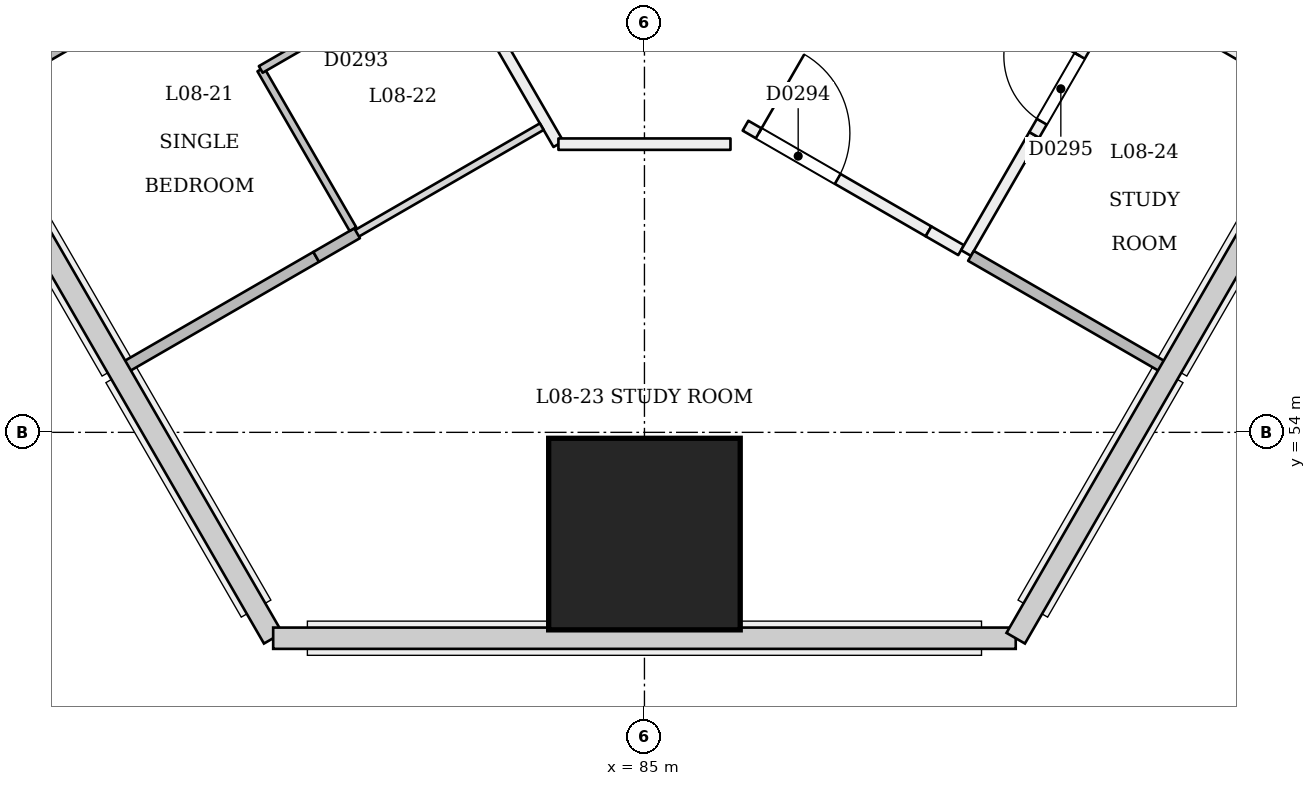
"""IFC4 building model, lengths in metres.
Left out: names, types, materials, properties, quantities, classifications, styles, units other than length and angle.
Written with IfcOpenShell. Run it as: python <this file> out.ifc"""

import sys

from ifc_helpers import new_model, si_unit, direction, frame, frame_2d, origin, origin_2d, place, context, subcontext, project, spatial, rectangle, extrude, element, fill, save


model = new_model("IFC4")
c1 = context("Model", 3, precision=1e-05, world=origin(), true_north=direction((0.0, 1.0)))
c2 = subcontext(c1, "Body", "Model", "MODEL_VIEW")
j1 = project(units=[si_unit("LENGTHUNIT", "METRE"), si_unit("PLANEANGLEUNIT", "RADIAN")], contexts=[c1])
p1 = place(None, origin())
s1 = spatial("IfcSite", under=j1, at=p1, CompositionType="ELEMENT")
p2 = place(p1, origin())
s2 = spatial("IfcBuilding", under=s1, at=p2, CompositionType="ELEMENT")
p3 = place(p2, frame((0.0, 0.0, 37.8)))
s3 = spatial("IfcBuildingStorey", under=s2, at=p3, CompositionType="ELEMENT", Elevation=37.8)
p4 = place(p3, frame((85.0, 52.592, 0.0), z_axis=(0.0, 0.058360852261, 0.998295552892), x_axis=(-1.0, 0.0, 0.0)))
e1 = element("IfcColumn", 1, at=p4, inside=s3, PredefinedType="COLUMN", context=c2, shape_type="SweptSolid", body=[
    extrude(rectangle(XDim=2.52, YDim=2.52, at=origin_2d()), origin(), (0.0, 0.0, 1.0), 3.606),
])
p5 = place(p3, frame((61.497, 96.54, 0.0), z_axis=(0.0, 0.0, 1.0), x_axis=(0.499995935097, -0.866027750645, 0.0)))
e2 = element("IfcWall", 2, at=p5, inside=s3, PredefinedType="PARTITIONING", context=c2, shape_type="SweptSolid", body=[
    extrude(rectangle(XDim=44.742, YDim=0.15, at=frame_2d((22.371, 0.0))), origin(), (0.0, 0.0, 1.0), 2.7),
])
p6 = place(p5, frame((1.84, 0.0, 0.0)))
e3 = element("IfcOpeningElement", 3, at=p6, cuts=e2, PredefinedType="OPENING", context=c2, shape_type="SweptSolid", body=[
    extrude(rectangle(XDim=1.0, YDim=2.1, at=frame_2d((0.5, 1.05))), frame((0.0, 0.085, 0.0), z_axis=(0.0, -1.0, 0.0), x_axis=(1.0, 0.0, 0.0)), (0.0, 0.0, 1.0), 0.171),
])
p7 = place(p5, frame((4.942, 0.0, 0.0)))
e4 = element("IfcOpeningElement", 4, at=p7, cuts=e2, PredefinedType="OPENING", context=c2, shape_type="SweptSolid", body=[
    extrude(rectangle(XDim=1.1, YDim=2.1, at=frame_2d((0.55, 1.05))), frame((0.0, 0.085, 0.0), z_axis=(0.0, -1.0, 0.0), x_axis=(1.0, 0.0, 0.0)), (0.0, 0.0, 1.0), 0.171),
])
p8 = place(p5, frame((11.651, 0.0, 0.0)))
e5 = element("IfcOpeningElement", 5, at=p8, cuts=e2, PredefinedType="OPENING", context=c2, shape_type="SweptSolid", body=[
    extrude(rectangle(XDim=1.0, YDim=2.1, at=frame_2d((0.5, 1.05))), frame((0.0, 0.085, 0.0), z_axis=(0.0, -1.0, 0.0), x_axis=(1.0, 0.0, 0.0)), (0.0, 0.0, 1.0), 0.171),
])
p9 = place(p5, frame((18.371, 0.0, 0.0)))
e6 = element("IfcOpeningElement", 6, at=p9, cuts=e2, PredefinedType="OPENING", context=c2, shape_type="SweptSolid", body=[
    extrude(rectangle(XDim=1.2, YDim=2.1, at=frame_2d((0.6, 1.05))), frame((0.0, 0.085, 0.0), z_axis=(0.0, -1.0, 0.0), x_axis=(1.0, 0.0, 0.0)), (0.0, 0.0, 1.0), 0.171),
])
p10 = place(p5, frame((23.092, 0.0, 0.0)))
e7 = element("IfcOpeningElement", 7, at=p10, cuts=e2, PredefinedType="OPENING", context=c2, shape_type="SweptSolid", body=[
    extrude(rectangle(XDim=1.0, YDim=2.1, at=frame_2d((0.5, 1.05))), frame((0.0, 0.085, 0.0), z_axis=(0.0, -1.0, 0.0), x_axis=(1.0, 0.0, 0.0)), (0.0, 0.0, 1.0), 0.171),
])
p11 = place(p5, frame((29.767, 0.0, 0.0)))
e8 = element("IfcOpeningElement", 8, at=p11, cuts=e2, PredefinedType="OPENING", context=c2, shape_type="SweptSolid", body=[
    extrude(rectangle(XDim=1.0, YDim=2.1, at=frame_2d((0.5, 1.05))), frame((0.0, 0.085, 0.0), z_axis=(0.0, -1.0, 0.0), x_axis=(1.0, 0.0, 0.0)), (0.0, 0.0, 1.0), 0.171),
])
p12 = place(p5, frame((31.976, 0.0, 0.0)))
e9 = element("IfcOpeningElement", 9, at=p12, cuts=e2, PredefinedType="OPENING", context=c2, shape_type="SweptSolid", body=[
    extrude(rectangle(XDim=1.0, YDim=2.1, at=frame_2d((0.5, 1.05))), frame((0.0, 0.085, 0.0), z_axis=(0.0, -1.0, 0.0), x_axis=(1.0, 0.0, 0.0)), (0.0, 0.0, 1.0), 0.171),
])
p13 = place(p5, frame((38.767, 0.0, 0.0)))
e10 = element("IfcOpeningElement", 10, at=p13, cuts=e2, PredefinedType="OPENING", context=c2, shape_type="SweptSolid", body=[
    extrude(rectangle(XDim=1.0, YDim=2.1, at=frame_2d((0.5, 1.05))), frame((0.0, 0.085, 0.0), z_axis=(0.0, -1.0, 0.0), x_axis=(1.0, 0.0, 0.0)), (0.0, 0.0, 1.0), 0.171),
])
p14 = place(p5, frame((40.707, 0.0, 0.0)))
e11 = element("IfcOpeningElement", 11, at=p14, cuts=e2, PredefinedType="OPENING", context=c2, shape_type="SweptSolid", body=[
    extrude(rectangle(XDim=1.0, YDim=2.1, at=frame_2d((0.5, 1.05))), frame((0.0, 0.085, 0.0), z_axis=(0.0, -1.0, 0.0), x_axis=(1.0, 0.0, 0.0)), (0.0, 0.0, 1.0), 0.171),
])
p15 = place(p3, frame((83.868, 57.792, 0.0), z_axis=(0.0, 0.0, 1.0), x_axis=(1.0, 0.0, 0.0)))
e12 = element("IfcWall", 12, at=p15, inside=s3, PredefinedType="PARTITIONING", context=c2, shape_type="SweptSolid", body=[
    extrude(rectangle(XDim=2.264, YDim=0.15, at=frame_2d((1.132, 0.0))), origin(), (0.0, 0.0, 1.0), 3.1),
])
p16 = place(p3, frame((86.33, 58.034, 0.0), z_axis=(0.0, 0.0, 1.0), x_axis=(0.86603494908, -0.499983466698, 0.0)))
e13 = element("IfcWall", 13, at=p16, inside=s3, PredefinedType="PARTITIONING", context=c2, shape_type="SweptSolid", body=[
    extrude(rectangle(XDim=2.78, YDim=0.15, at=frame_2d((1.39, 0.0))), origin(), (0.0, 0.0, 1.0), 3.1),
])
p17 = place(p16, frame((0.2, 0.0, 0.0)))
e14 = element("IfcOpeningElement", 14, at=p17, cuts=e13, PredefinedType="OPENING", context=c2, shape_type="SweptSolid", body=[
    extrude(rectangle(XDim=1.2, YDim=2.1, at=frame_2d((0.6, 1.05))), frame((0.0, 0.085, 0.0), z_axis=(0.0, -1.0, 0.0), x_axis=(1.0, 0.0, 0.0)), (0.0, 0.0, 1.0), 0.171),
])
p18 = place(p3, frame((88.737, 56.645, 0.0), z_axis=(0.0, 0.0, 1.0), x_axis=(0.866111716277, -0.49985047257, 0.0)))
e15 = element("IfcWall", 15, at=p18, inside=s3, PredefinedType="PARTITIONING", context=c2, shape_type="SweptSolid", body=[
    extrude(rectangle(XDim=0.495, YDim=0.15, at=frame_2d((0.248, 0.0))), origin(), (0.0, 0.0, 1.0), 2.6),
])
p19 = place(p3, frame((89.231, 56.359, 0.0), z_axis=(0.0, 0.0, 1.0), x_axis=(0.500016891966, 0.866015650984, 0.0)))
e16 = element("IfcWall", 16, at=p19, inside=s3, PredefinedType="PARTITIONING", context=c2, shape_type="SweptSolid", body=[
    extrude(rectangle(XDim=1.794, YDim=0.15, at=frame_2d((0.897, 0.0))), origin(), (0.0, 0.0, 1.0), 2.6),
])
p20 = place(p3, frame((90.128, 57.913, 0.0), z_axis=(0.0, 0.0, 1.0), x_axis=(0.499947354807, 0.866055796367, 0.0)))
e17 = element("IfcWall", 17, at=p20, inside=s3, PredefinedType="PARTITIONING", context=c2, shape_type="SweptSolid", body=[
    extrude(rectangle(XDim=2.193, YDim=0.15, at=frame_2d((1.096, 0.0))), origin(), (0.0, 0.0, 1.0), 3.1),
])
p21 = place(p20, frame((0.2, 0.0, 0.0)))
e18 = element("IfcOpeningElement", 18, at=p21, cuts=e17, PredefinedType="OPENING", context=c2, shape_type="SweptSolid", body=[
    extrude(rectangle(XDim=1.0, YDim=2.1, at=frame_2d((0.5, 1.05))), frame((0.0, 0.085, 0.0), z_axis=(0.0, -1.0, 0.0), x_axis=(1.0, 0.0, 0.0)), (0.0, 0.0, 1.0), 0.171),
])
p22 = place(p3, frame((76.123, 58.367, 0.0), z_axis=(0.0, 0.0, 1.0), x_axis=(0.866025401434, 0.500000004071, 0.0)))
e19 = element("IfcWall", 19, at=p22, inside=s3, PredefinedType="PARTITIONING", context=c2, shape_type="SweptSolid", body=[
    extrude(rectangle(XDim=6.345, YDim=0.15, at=frame_2d((3.173, 0.0))), origin(), (0.0, 0.0, 1.0), 2.6),
])
p23 = place(p3, frame((81.165, 56.674, 0.0), z_axis=(0.0, 0.0, 1.0), x_axis=(-0.499972286653, 0.866041403502, 0.0)))
e20 = element("IfcWall", 20, at=p23, inside=s3, PredefinedType="PARTITIONING", context=c2, shape_type="SweptSolid", body=[
    extrude(rectangle(XDim=2.425, YDim=0.1, at=frame_2d((1.212, 0.0))), origin(), (0.0, 0.0, 1.0), 2.6),
])
p24 = place(p3, frame((79.952, 58.774, 0.0), z_axis=(0.0, 0.0, 1.0), x_axis=(0.866011447264, 0.500024172624, 0.0)))
e21 = element("IfcWall", 21, at=p24, inside=s3, PredefinedType="PARTITIONING", context=c2, shape_type="SweptSolid", body=[
    extrude(rectangle(XDim=2.825, YDim=0.1, at=frame_2d((1.413, 0.0))), origin(), (0.0, 0.0, 1.0), 3.1),
])
p25 = place(p24, frame((1.0, 0.0, 0.0)))
e22 = element("IfcOpeningElement", 22, at=p25, cuts=e21, PredefinedType="OPENING", context=c2, shape_type="SweptSolid", body=[
    extrude(rectangle(XDim=0.9, YDim=2.1, at=frame_2d((0.45, 1.05))), frame((0.0, 0.061, 0.0), z_axis=(0.0, -1.0, 0.0), x_axis=(1.0, 0.0, 0.0)), (0.0, 0.0, 1.0), 0.121),
])
p26 = place(p3, frame((78.154, 54.849, 0.0), z_axis=(0.0, 0.0, 1.0), x_axis=(0.866057444692, 0.499944499413, 0.0)))
e23 = element("IfcWall", 23, at=p26, inside=s3, PredefinedType="PARTITIONING", context=c2, shape_type="SweptSolid", body=[
    extrude(rectangle(XDim=2.919, YDim=0.15, at=frame_2d((1.459, 0.0))), origin(), (0.0, 0.0, 1.0), 3.1),
])
p27 = place(p3, frame((80.681, 56.309, 0.0), z_axis=(0.0, 0.0, 1.0), x_axis=(0.865936922628, 0.500153222552, 0.0)))
e24 = element("IfcWall", 24, at=p27, inside=s3, PredefinedType="PARTITIONING", context=c2, shape_type="SweptSolid", body=[
    extrude(rectangle(XDim=0.621, YDim=0.15, at=frame_2d((0.311, 0.0))), origin(), (0.0, 0.0, 1.0), 2.6),
])
p28 = place(p3, frame((81.185, 56.599, 0.0), z_axis=(0.0, 0.0, 1.0), x_axis=(0.866011243319, 0.500024525844, 0.0)))
e25 = element("IfcWall", 25, at=p28, inside=s3, PredefinedType="PARTITIONING", context=c2, shape_type="SweptSolid", body=[
    extrude(rectangle(XDim=2.845, YDim=0.1, at=frame_2d((1.422, 0.0))), origin(), (0.0, 0.0, 1.0), 2.6),
])
p29 = place(p3, frame((91.846, 54.849, 0.0), z_axis=(0.0, 0.0, 1.0), x_axis=(-0.866046160531, 0.499964046536, 0.0)))
e26 = element("IfcWall", 26, at=p29, inside=s3, PredefinedType="PARTITIONING", context=c2, shape_type="SweptSolid", body=[
    extrude(rectangle(XDim=2.945, YDim=0.15, at=frame_2d((1.473, 0.0))), origin(), (0.0, 0.0, 1.0), 3.1),
])
p30 = place(p3, frame((93.877, 58.367, 0.0), z_axis=(0.0, 0.0, 1.0), x_axis=(-0.866050933658, 0.499955778354, 0.0)))
e27 = element("IfcWall", 27, at=p30, inside=s3, PredefinedType="PARTITIONING", context=c2, shape_type="SweptSolid", body=[
    extrude(rectangle(XDim=4.74, YDim=0.15, at=frame_2d((2.37, 0.0))), origin(), (0.0, 0.0, 1.0), 2.6),
])
p31 = place(p17, origin())
e28 = element("IfcDoor", 28, at=p31, inside=s3, OperationType="SINGLE_SWING_LEFT", PredefinedType="NOTDEFINED", context=c2, shape_type="SweptSolid", body=[
    extrude(rectangle(XDim=1.2, YDim=2.1, at=frame_2d((0.6, 1.05))), frame((0.0, 0.025, 0.0), z_axis=(0.0, -1.0, 0.0), x_axis=(1.0, 0.0, 0.0)), (0.0, 0.0, 1.0), 0.05),
])
fill(e14, e28)
p32 = place(p21, origin())
e29 = element("IfcDoor", 29, at=p32, inside=s3, OperationType="SINGLE_SWING_RIGHT", PredefinedType="NOTDEFINED", context=c2, shape_type="SweptSolid", body=[
    extrude(rectangle(XDim=1.0, YDim=2.1, at=frame_2d((0.5, 1.05))), frame((0.0, 0.025, 0.0), z_axis=(0.0, -1.0, 0.0), x_axis=(1.0, 0.0, 0.0)), (0.0, 0.0, 1.0), 0.05),
])
fill(e18, e29)
save(model, sys.argv[1])
